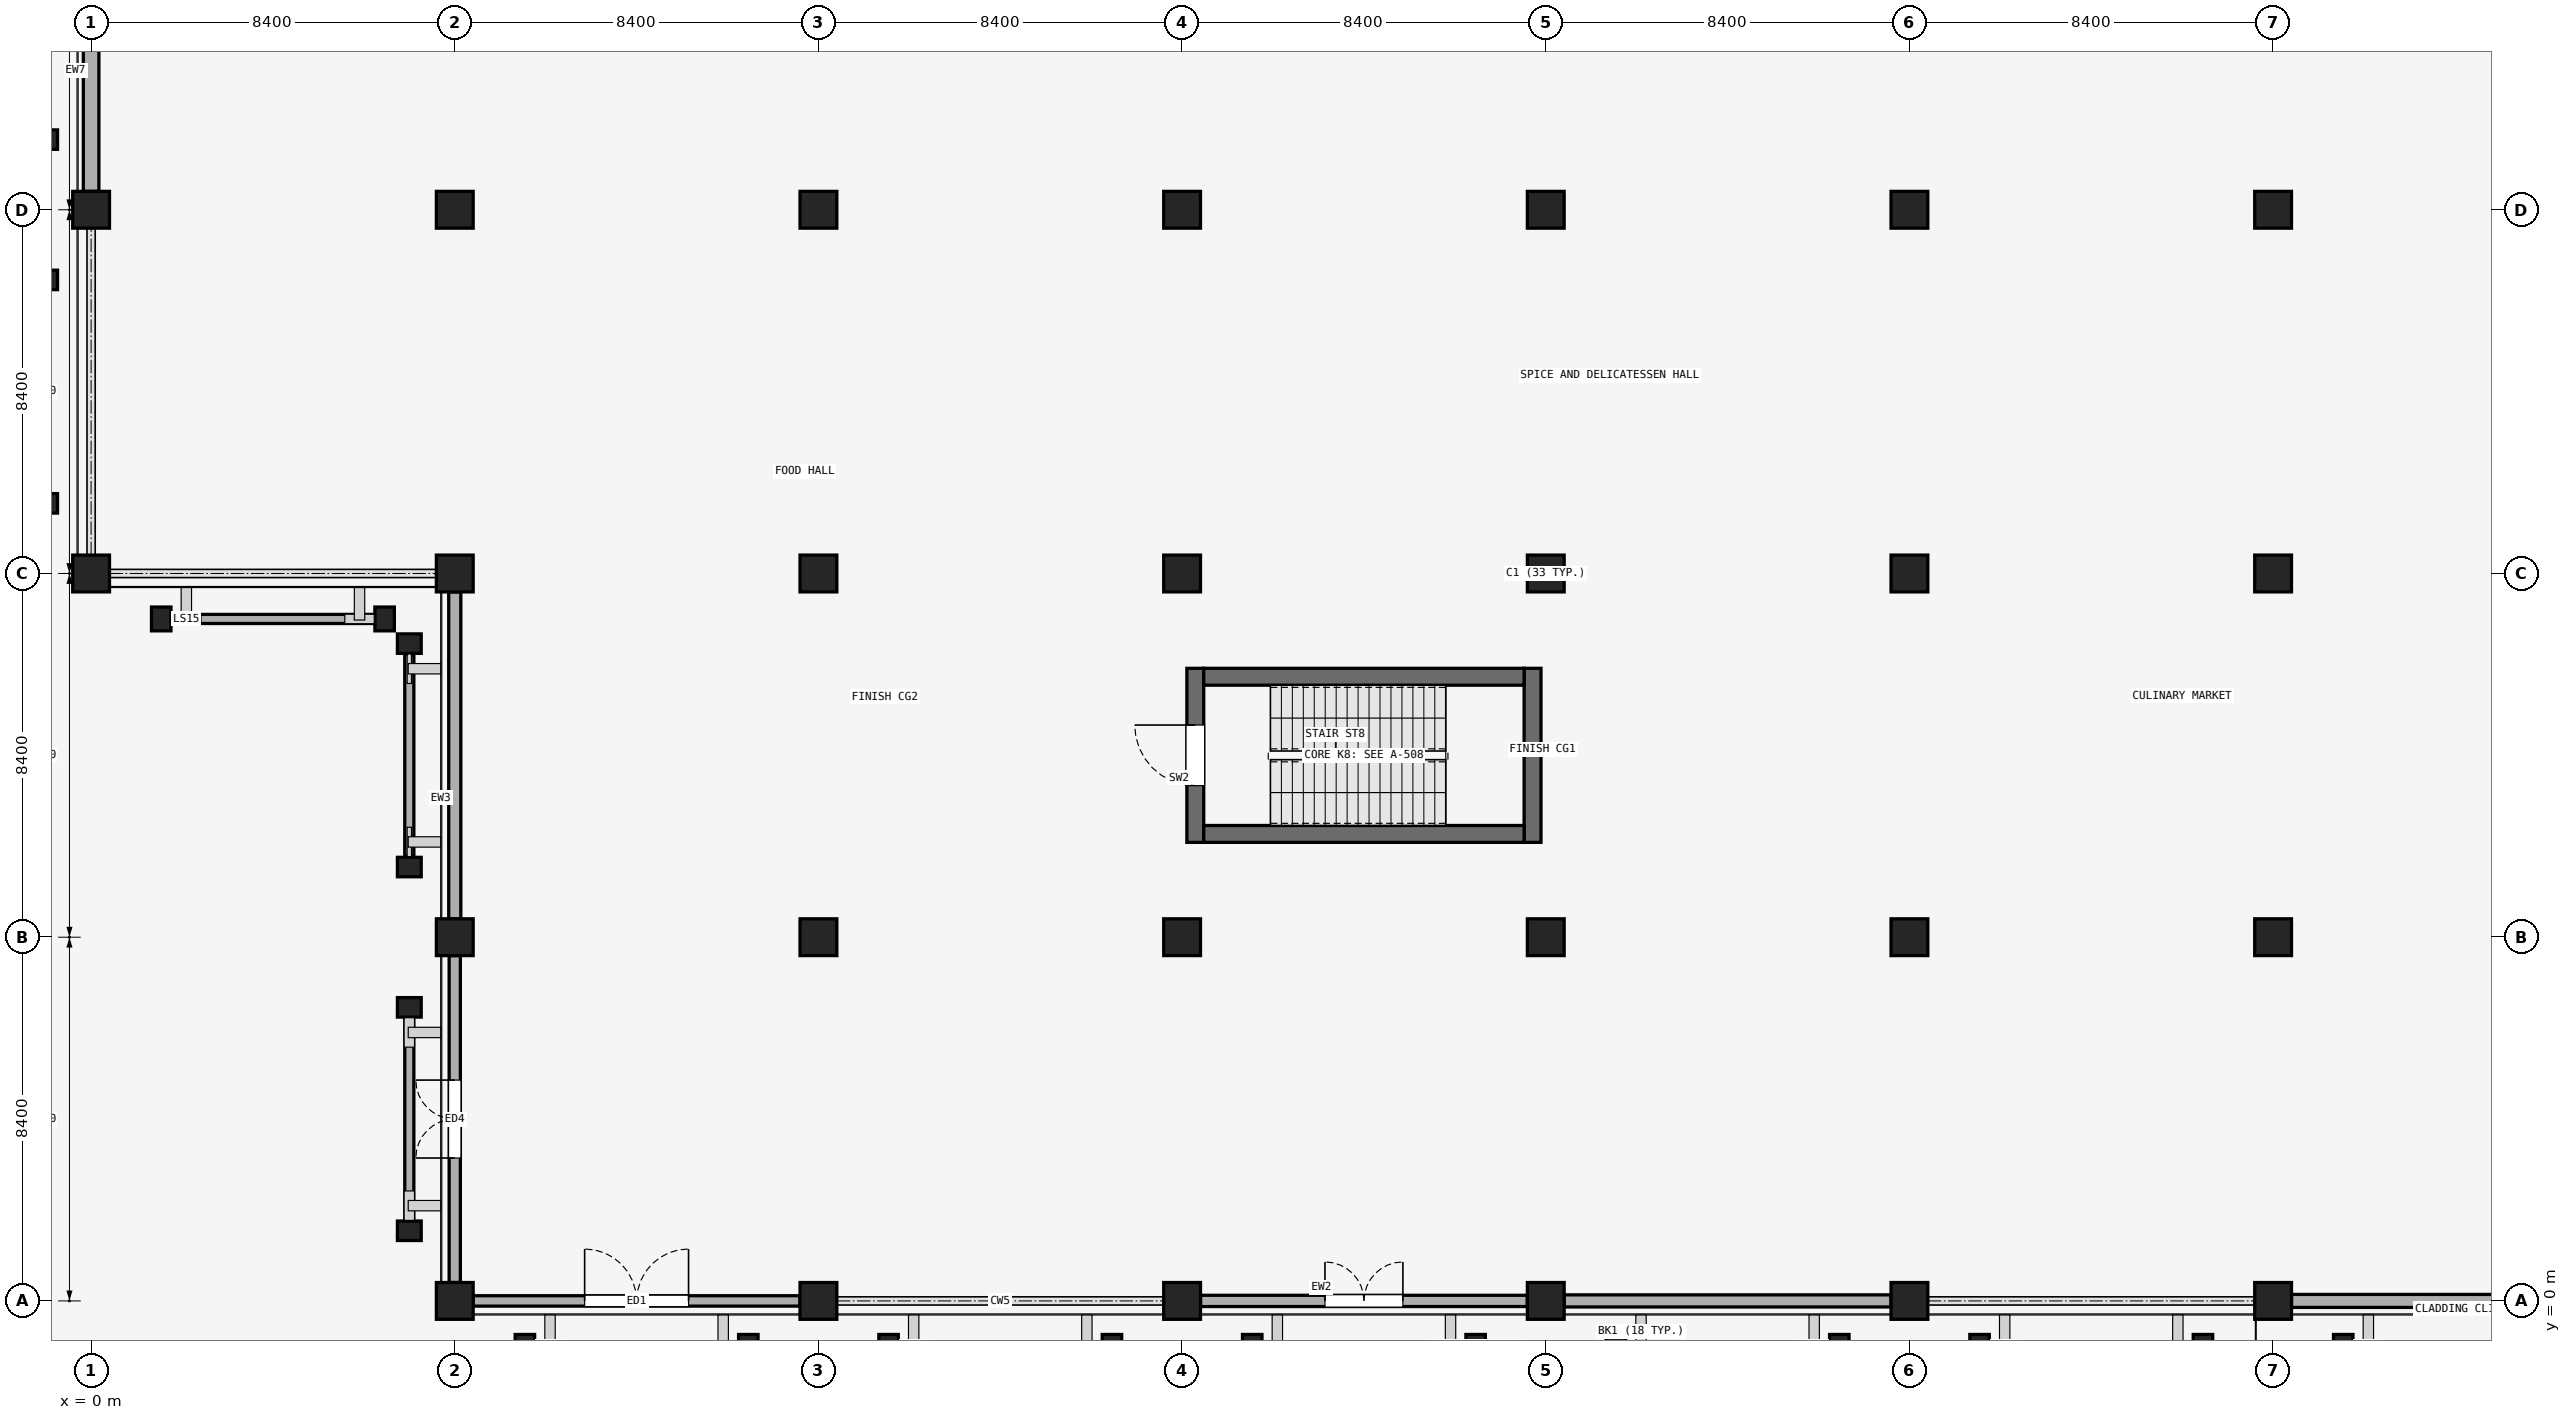
"""IFC4 building model, lengths in metres.
Left out: names, types, materials, properties, quantities, classifications, styles, units other than length and angle.
Written with IfcOpenShell. Run it as: python <this file> out.ifc"""

import sys

from ifc_helpers import new_model, si_unit, direction, frame, frame_2d, origin, origin_2d, place, context, subcontext, project, spatial, rectangle, extrude, element, fill, save


model = new_model("IFC4")
c1 = context("Model", 3, precision=1e-05, world=origin(), true_north=direction((0.0, 1.0)))
c2 = subcontext(c1, "Body", "Model", "MODEL_VIEW")
j1 = project(units=[si_unit("LENGTHUNIT", "METRE"), si_unit("PLANEANGLEUNIT", "RADIAN")], contexts=[c1])
p1 = place(None, origin())
s1 = spatial("IfcSite", under=j1, at=p1, CompositionType="ELEMENT")
p2 = place(p1, origin())
s2 = spatial("IfcBuilding", under=s1, at=p2, CompositionType="ELEMENT")
p3 = place(p2, origin())
s3 = spatial("IfcBuildingStorey", under=s2, at=p3, CompositionType="ELEMENT", Elevation=0.0)
for number, where, z_axis, x_axis in (
    (1, (8.4, 0.0, 0.0), (0.0, 0.0, 1.0), (1.0, 0.0, 0.0)),
    (2, (16.8, 0.0, 0.0), (0.0, 0.0, 1.0), (1.0, 0.0, 0.0)),
    (3, (25.2, 0.0, 0.0), (0.0, 0.0, 1.0), (1.0, 0.0, 0.0)),
    (4, (33.6, 0.0, 0.0), (0.0, 0.0, 1.0), (1.0, 0.0, 0.0)),
    (5, (42.0, 0.0, 0.0), (0.0, 0.0, 1.0), (1.0, 0.0, 0.0)),
    (6, (50.4, 0.0, 0.0), (0.0, 0.0, 1.0), (1.0, 0.0, 0.0)),
    (7, (8.4, 8.4, 0.0), (0.0, 0.0, 1.0), (1.0, 0.0, 0.0)),
    (8, (16.8, 8.4, 0.0), (0.0, 0.0, 1.0), (1.0, 0.0, 0.0)),
    (9, (25.2, 8.4, 0.0), (0.0, 0.0, 1.0), (1.0, 0.0, 0.0)),
    (10, (33.6, 8.4, 0.0), (0.0, 0.0, 1.0), (1.0, 0.0, 0.0)),
    (11, (42.0, 8.4, 0.0), (0.0, 0.0, 1.0), (1.0, 0.0, 0.0)),
    (12, (50.4, 8.4, 0.0), (0.0, 0.0, 1.0), (1.0, 0.0, 0.0)),
    (13, (0.0, 16.8, 0.0), (0.0, 0.0, 1.0), (1.0, 0.0, 0.0)),
    (14, (8.4, 16.8, 0.0), (0.0, 0.0, 1.0), (1.0, 0.0, 0.0)),
    (15, (16.8, 16.8, 0.0), (0.0, 0.0, 1.0), (1.0, 0.0, 0.0)),
    (16, (25.2, 16.8, 0.0), (0.0, 0.0, 1.0), (1.0, 0.0, 0.0)),
    (17, (33.6, 16.8, 0.0), (0.0, 0.0, 1.0), (1.0, 0.0, 0.0)),
    (18, (42.0, 16.8, 0.0), (0.0, 0.0, 1.0), (1.0, 0.0, 0.0)),
    (19, (50.4, 16.8, 0.0), (0.0, 0.0, 1.0), (1.0, 0.0, 0.0)),
    (20, (0.0, 25.2, 0.0), (0.0, 0.0, 1.0), (1.0, 0.0, 0.0)),
    (21, (8.4, 25.2, 0.0), (0.0, 0.0, 1.0), (1.0, 0.0, 0.0)),
    (22, (16.8, 25.2, 0.0), (0.0, 0.0, 1.0), (1.0, 0.0, 0.0)),
    (23, (25.2, 25.2, 0.0), (0.0, 0.0, 1.0), (1.0, 0.0, 0.0)),
    (24, (33.6, 25.2, 0.0), (0.0, 0.0, 1.0), (1.0, 0.0, 0.0)),
    (25, (42.0, 25.2, 0.0), (0.0, 0.0, 1.0), (1.0, 0.0, 0.0)),
    (26, (50.4, 25.2, 0.0), (0.0, 0.0, 1.0), (1.0, 0.0, 0.0)),
):
    element("IfcColumn", number, at=place(p3, frame(where, z_axis=z_axis, x_axis=x_axis)), inside=s3, PredefinedType="COLUMN", context=c2, shape_type="SweptSolid", body=[
        extrude(rectangle(XDim=0.85, YDim=0.85, at=origin_2d()), origin(), (0.0, 0.0, 1.0), 5.4),
    ])
for number, where, z_axis, x_axis in (
    (27, (1.62, 15.75, 0.0), (0.0, 0.0, 1.0), (1.0, 0.0, 0.0)),
    (28, (6.78, 15.75, 0.0), (0.0, 0.0, 1.0), (1.0, 0.0, 0.0)),
    (29, (10.02, -1.05, 0.0), (0.0, 0.0, 1.0), (1.0, 0.0, 0.0)),
    (30, (15.18, -1.05, 0.0), (0.0, 0.0, 1.0), (1.0, 0.0, 0.0)),
    (31, (18.42, -1.05, 0.0), (0.0, 0.0, 1.0), (1.0, 0.0, 0.0)),
    (32, (23.58, -1.05, 0.0), (0.0, 0.0, 1.0), (1.0, 0.0, 0.0)),
    (33, (26.82, -1.05, 0.0), (0.0, 0.0, 1.0), (1.0, 0.0, 0.0)),
    (34, (31.98, -1.05, 0.0), (0.0, 0.0, 1.0), (1.0, 0.0, 0.0)),
    (35, (35.22, -1.05, 0.0), (0.0, 0.0, 1.0), (1.0, 0.0, 0.0)),
    (36, (40.38, -1.05, 0.0), (0.0, 0.0, 1.0), (1.0, 0.0, 0.0)),
    (37, (43.62, -1.05, 0.0), (0.0, 0.0, 1.0), (1.0, 0.0, 0.0)),
    (38, (48.78, -1.05, 0.0), (0.0, 0.0, 1.0), (1.0, 0.0, 0.0)),
    (39, (52.02, -1.05, 0.0), (0.0, 0.0, 1.0), (1.0, 0.0, 0.0)),
    (40, (-1.05, 18.42, 0.0), (0.0, 0.0, 1.0), (0.0, 1.0, 0.0)),
    (41, (-1.05, 23.58, 0.0), (0.0, 0.0, 1.0), (0.0, 1.0, 0.0)),
    (42, (-1.05, 26.82, 0.0), (0.0, 0.0, 1.0), (0.0, 1.0, 0.0)),
    (43, (7.35, 1.62, 0.0), (0.0, 0.0, 1.0), (0.0, 1.0, 0.0)),
    (44, (7.35, 6.78, 0.0), (0.0, 0.0, 1.0), (0.0, 1.0, 0.0)),
    (45, (7.35, 10.02, 0.0), (0.0, 0.0, 1.0), (0.0, 1.0, 0.0)),
    (46, (7.35, 15.18, 0.0), (0.0, 0.0, 1.0), (0.0, 1.0, 0.0)),
):
    element("IfcColumn", number, at=place(p3, frame(where, z_axis=z_axis, x_axis=x_axis)), inside=s3, PredefinedType="PILASTER", context=c2, shape_type="SweptSolid", body=[
        extrude(rectangle(XDim=0.45, YDim=0.55, at=origin_2d()), origin(), (0.0, 0.0, 1.0), 5.4),
    ])
p4 = place(p3, frame((8.825, 0.0, 0.0), z_axis=(0.0, 0.0, 1.0), x_axis=(1.0, 0.0, 0.0)))
e47 = element("IfcWall", 47, at=p4, inside=s3, PredefinedType="SOLIDWALL", context=c2, shape_type="SweptSolid", body=[
    extrude(rectangle(XDim=7.55, YDim=0.24, at=frame_2d((3.775, 0.0))), origin(), (0.0, 0.0, 1.0), 4.33),
])
p5 = place(p4, frame((2.575, 0.0, 0.0)))
e48 = element("IfcOpeningElement", 48, at=p5, cuts=e47, PredefinedType="OPENING", context=c2, shape_type="SweptSolid", body=[
    extrude(rectangle(XDim=2.4, YDim=2.6, at=frame_2d((1.2, 1.3))), frame((0.0, 0.13, 0.0), z_axis=(0.0, -1.0, 0.0), x_axis=(1.0, 0.0, 0.0)), (0.0, 0.0, 1.0), 0.26),
])
p6 = place(p3, frame((25.625, 0.0, 0.0), z_axis=(0.0, 0.0, 1.0), x_axis=(1.0, 0.0, 0.0)))
e49 = element("IfcWall", 49, at=p6, inside=s3, PredefinedType="SOLIDWALL", context=c2, shape_type="SweptSolid", body=[
    extrude(rectangle(XDim=7.55, YDim=0.26, at=frame_2d((3.775, 0.0))), origin(), (0.0, 0.0, 1.0), 4.33),
])
p7 = place(p6, frame((2.875, 0.0, 0.0)))
e50 = element("IfcOpeningElement", 50, at=p7, cuts=e49, PredefinedType="OPENING", context=c2, shape_type="SweptSolid", body=[
    extrude(rectangle(XDim=1.8, YDim=2.4, at=frame_2d((0.9, 1.2))), frame((0.0, 0.14, 0.0), z_axis=(0.0, -1.0, 0.0), x_axis=(1.0, 0.0, 0.0)), (0.0, 0.0, 1.0), 0.28),
])
p8 = place(p3, frame((34.025, 0.0, 0.0), z_axis=(0.0, 0.0, 1.0), x_axis=(1.0, 0.0, 0.0)))
e51 = element("IfcWall", 51, at=p8, inside=s3, PredefinedType="SOLIDWALL", context=c2, shape_type="SweptSolid", body=[
    extrude(rectangle(XDim=7.55, YDim=0.28, at=frame_2d((3.775, 0.0))), origin(), (0.0, 0.0, 1.0), 4.33),
])
p9 = place(p3, frame((50.825, 0.0, 0.0), z_axis=(0.0, 0.0, 1.0), x_axis=(1.0, 0.0, 0.0)))
e52 = element("IfcWall", 52, at=p9, inside=s3, PredefinedType="SOLIDWALL", context=c2, shape_type="SweptSolid", body=[
    extrude(rectangle(XDim=7.55, YDim=0.3, at=frame_2d((3.775, 0.0))), origin(), (0.0, 0.0, 1.0), 4.33),
])
p10 = place(p3, frame((0.0, 25.625, 0.0), z_axis=(0.0, 0.0, 1.0), x_axis=(0.0, 1.0, 0.0)))
e53 = element("IfcWall", 53, at=p10, inside=s3, PredefinedType="SOLIDWALL", context=c2, shape_type="SweptSolid", body=[
    extrude(rectangle(XDim=7.55, YDim=0.36, at=frame_2d((3.775, 0.0))), origin(), (0.0, 0.0, 1.0), 4.33),
])
p11 = place(p3, frame((8.4, 0.425, 0.0), z_axis=(0.0, 0.0, 1.0), x_axis=(0.0, 1.0, 0.0)))
e54 = element("IfcWall", 54, at=p11, inside=s3, PredefinedType="SOLIDWALL", context=c2, shape_type="SweptSolid", body=[
    extrude(rectangle(XDim=7.55, YDim=0.26, at=frame_2d((3.775, 0.0))), origin(), (0.0, 0.0, 1.0), 4.33),
])
p12 = place(p11, frame((2.875, 0.0, 0.0)))
e55 = element("IfcOpeningElement", 55, at=p12, cuts=e54, PredefinedType="OPENING", context=c2, shape_type="SweptSolid", body=[
    extrude(rectangle(XDim=1.8, YDim=2.4, at=frame_2d((0.9, 1.2))), frame((0.0, 0.14, 0.0), z_axis=(0.0, -1.0, 0.0), x_axis=(1.0, 0.0, 0.0)), (0.0, 0.0, 1.0), 0.28),
])
p13 = place(p3, frame((8.4, 8.825, 0.0), z_axis=(0.0, 0.0, 1.0), x_axis=(0.0, 1.0, 0.0)))
e56 = element("IfcWall", 56, at=p13, inside=s3, PredefinedType="SOLIDWALL", context=c2, shape_type="SweptSolid", body=[
    extrude(rectangle(XDim=7.55, YDim=0.28, at=frame_2d((3.775, 0.0))), origin(), (0.0, 0.0, 1.0), 4.33),
])
for number, where, z_axis, x_axis in (
    (57, (1.87, 15.75, 4.78), (0.0, 0.0, 1.0), (1.0, 0.0, 0.0)),
    (58, (7.35, 1.87, 4.78), (0.0, 0.0, 1.0), (0.0, 1.0, 0.0)),
    (59, (7.35, 10.27, 4.78), (0.0, 0.0, 1.0), (0.0, 1.0, 0.0)),
):
    element("IfcWall", number, at=place(p3, frame(where, z_axis=z_axis, x_axis=x_axis)), inside=s3, PredefinedType="PARAPET", context=c2, shape_type="SweptSolid", body=[
        extrude(rectangle(XDim=4.66, YDim=0.21, at=frame_2d((2.33, 0.0))), origin(), (0.0, 0.0, 1.0), 0.12),
    ])
p14 = place(p3, frame((25.505, 10.59, 0.0), z_axis=(0.0, 0.0, 1.0), x_axis=(0.0, 1.0, 0.0)))
e60 = element("IfcWall", 60, at=p14, inside=s3, PredefinedType="SHEAR", context=c2, shape_type="SweptSolid", body=[
    extrude(rectangle(XDim=4.02, YDim=0.39, at=frame_2d((2.01, 0.0))), origin(), (0.0, 0.0, 1.0), 5.08),
])
p15 = place(p14, frame((1.31, 0.0, 0.0)))
e61 = element("IfcOpeningElement", 61, at=p15, cuts=e60, PredefinedType="OPENING", context=c2, shape_type="SweptSolid", body=[
    extrude(rectangle(XDim=1.4, YDim=2.15, at=frame_2d((0.7, 1.075))), frame((0.0, 0.205, 0.0), z_axis=(0.0, -1.0, 0.0), x_axis=(1.0, 0.0, 0.0)), (0.0, 0.0, 1.0), 0.41),
])
p16 = place(p3, frame((33.295, 10.59, 0.0), z_axis=(0.0, 0.0, 1.0), x_axis=(0.0, 1.0, 0.0)))
e62 = element("IfcWall", 62, at=p16, inside=s3, PredefinedType="SHEAR", context=c2, shape_type="SweptSolid", body=[
    extrude(rectangle(XDim=4.02, YDim=0.39, at=frame_2d((2.01, 0.0))), origin(), (0.0, 0.0, 1.0), 5.08),
])
for number, where, z_axis, x_axis in (
    (63, (25.7, 10.785, 0.0), (0.0, 0.0, 1.0), (1.0, 0.0, 0.0)),
    (64, (25.7, 14.415, 0.0), (0.0, 0.0, 1.0), (1.0, 0.0, 0.0)),
):
    element("IfcWall", number, at=place(p3, frame(where, z_axis=z_axis, x_axis=x_axis)), inside=s3, PredefinedType="SHEAR", context=c2, shape_type="SweptSolid", body=[
        extrude(rectangle(XDim=7.4, YDim=0.39, at=frame_2d((3.7, 0.0))), origin(), (0.0, 0.0, 1.0), 5.08),
    ])
p17 = place(p5, origin())
e65 = element("IfcDoor", 65, at=p17, inside=s3, OperationType="DOUBLE_DOOR_SINGLE_SWING", PredefinedType="DOOR", context=c2, shape_type="SweptSolid", body=[
    extrude(rectangle(XDim=2.4, YDim=2.6, at=frame_2d((1.2, 1.3))), frame((0.0, 0.025, 0.0), z_axis=(0.0, -1.0, 0.0), x_axis=(1.0, 0.0, 0.0)), (0.0, 0.0, 1.0), 0.05),
])
fill(e48, e65)
p18 = place(p7, origin())
e66 = element("IfcDoor", 66, at=p18, inside=s3, OperationType="DOUBLE_DOOR_SINGLE_SWING", PredefinedType="DOOR", context=c2, shape_type="SweptSolid", body=[
    extrude(rectangle(XDim=1.8, YDim=2.4, at=frame_2d((0.9, 1.2))), frame((0.0, 0.025, 0.0), z_axis=(0.0, -1.0, 0.0), x_axis=(1.0, 0.0, 0.0)), (0.0, 0.0, 1.0), 0.05),
])
fill(e50, e66)
p19 = place(p12, origin())
e67 = element("IfcDoor", 67, at=p19, inside=s3, OperationType="DOUBLE_DOOR_SINGLE_SWING", PredefinedType="DOOR", context=c2, shape_type="SweptSolid", body=[
    extrude(rectangle(XDim=1.8, YDim=2.4, at=frame_2d((0.9, 1.2))), frame((0.0, 0.025, 0.0), z_axis=(0.0, -1.0, 0.0), x_axis=(1.0, 0.0, 0.0)), (0.0, 0.0, 1.0), 0.05),
])
fill(e55, e67)
p20 = place(p15, origin())
e68 = element("IfcDoor", 68, at=p20, inside=s3, OperationType="SINGLE_SWING_RIGHT", PredefinedType="DOOR", context=c2, shape_type="SweptSolid", body=[
    extrude(rectangle(XDim=1.4, YDim=2.15, at=frame_2d((0.7, 1.075))), frame((0.0, 0.025, 0.0), z_axis=(0.0, -1.0, 0.0), x_axis=(1.0, 0.0, 0.0)), (0.0, 0.0, 1.0), 0.05),
])
fill(e61, e68)
save(model, sys.argv[1])
